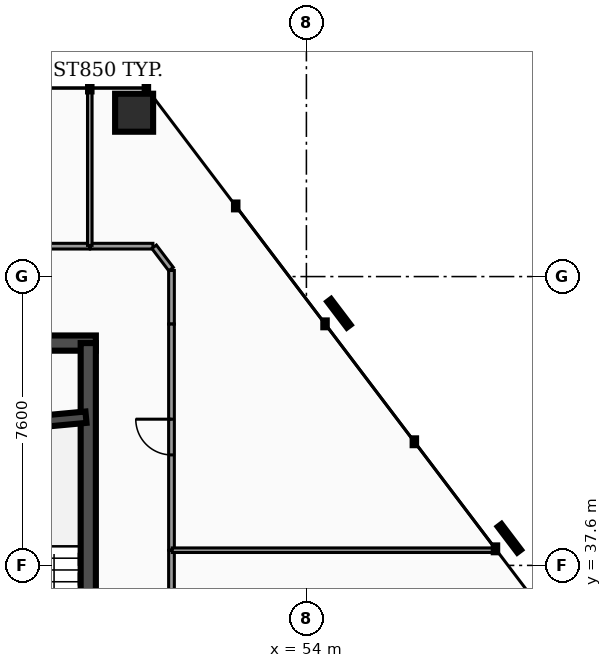
"""IFC4 building model, lengths in metres.
Left out: names, types, materials, properties, quantities, classifications, styles, units other than length and angle.
Written with IfcOpenShell. Run it as: python <this file> out.ifc"""

import sys

from ifc_helpers import new_model, si_unit, direction, frame, frame_2d, origin, origin_2d, place, context, subcontext, project, spatial, rectangle, hollow_rectangle, extrude, element, fill, save


model = new_model("IFC4")
c1 = context("Model", 3, precision=1e-05, world=origin(), true_north=direction((0.0, 1.0)))
c2 = subcontext(c1, "Body", "Model", "MODEL_VIEW")
j1 = project(units=[si_unit("LENGTHUNIT", "METRE"), si_unit("PLANEANGLEUNIT", "RADIAN")], contexts=[c1])
p1 = place(None, origin())
s1 = spatial("IfcSite", under=j1, at=p1, CompositionType="ELEMENT")
p2 = place(p1, origin())
s2 = spatial("IfcBuilding", under=s1, at=p2, CompositionType="ELEMENT")
p3 = place(p2, frame((0.0, 0.0, 35.7)))
s3 = spatial("IfcBuildingStorey", under=s2, at=p3, CompositionType="ELEMENT", Elevation=35.7)
p4 = place(p3, frame((28.4, 43.45, 0.0), z_axis=(0.0, 0.0, 1.0), x_axis=(1.0, 0.0, 0.0)))
e1 = element("IfcWall", 1, at=p4, inside=s3, PredefinedType="SHEAR", context=c2, shape_type="SweptSolid", body=[
    extrude(rectangle(XDim=20.06, YDim=0.4, at=frame_2d((10.03, 0.0))), origin(), (0.0, 0.0, 1.0), 3.82),
])
p5 = place(p3, frame((48.26, 33.25, 0.0), z_axis=(0.0, 0.0, 1.0), x_axis=(0.0, 1.0, 0.0)))
e2 = element("IfcWall", 2, at=p5, inside=s3, PredefinedType="SHEAR", context=c2, shape_type="SweptSolid", body=[
    extrude(rectangle(XDim=10.2, YDim=0.4, at=frame_2d((5.1, 0.0))), origin(), (0.0, 0.0, 1.0), 3.82),
])
p6 = place(p3, frame((44.98, 41.2, 0.0), z_axis=(0.0, 0.0, 1.0), x_axis=(0.995686468965, 0.09278176286, 0.0)))
e3 = element("IfcWall", 3, at=p6, inside=s3, PredefinedType="SHEAR", context=c2, shape_type="SweptSolid", body=[
    extrude(rectangle(XDim=3.234, YDim=0.3, at=frame_2d((1.617, 0.0))), origin(), (0.0, 0.0, 1.0), 3.82),
])
p7 = place(p3, frame((49.466, 49.511, 0.0), z_axis=(0.144992669911, -0.030212073329, 0.988971362729), x_axis=(0.20398833749, 0.978973318415, 0.0)))
e4 = element("IfcColumn", 4, at=p7, inside=s3, PredefinedType="COLUMN", context=c2, shape_type="SweptSolid", body=[
    extrude(hollow_rectangle(XDim=1.0, YDim=1.0, WallThickness=0.05, at=origin_2d()), origin(), (0.0, 0.0, 1.0), 3.863),
])
p8 = place(p3, frame((50.45, 30.17, 0.0), z_axis=(0.0, 0.0, 1.0), x_axis=(0.0, 1.0, 0.0)))
e5 = element("IfcWall", 5, at=p8, inside=s3, PredefinedType="PARTITIONING", context=c2, shape_type="SweptSolid", body=[
    extrude(rectangle(XDim=7.825, YDim=0.15, at=frame_2d((3.913, 0.0))), origin(), (0.0, 0.0, 1.0), 2.777),
])
p9 = place(p8, frame((3.442, 0.0, 0.0)))
e6 = element("IfcOpeningElement", 6, at=p9, cuts=e5, PredefinedType="OPENING", context=c2, shape_type="SweptSolid", body=[
    extrude(rectangle(XDim=0.94, YDim=2.05, at=frame_2d((0.47, 1.025))), frame((0.0, 0.085, 0.0), z_axis=(0.0, -1.0, 0.0), x_axis=(1.0, 0.0, 0.0)), (0.0, 0.0, 1.0), 0.17),
])
p10 = place(p3, frame((48.315, 46.0, 0.0), z_axis=(0.0, 0.0, 1.0), x_axis=(1.0, 0.0, 0.0)))
e7 = element("IfcWall", 7, at=p10, inside=s3, PredefinedType="PARTITIONING", context=c2, shape_type="SweptSolid", body=[
    extrude(rectangle(XDim=1.646, YDim=0.15, at=frame_2d((0.823, 0.0))), origin(), (0.0, 0.0, 1.0), 2.777),
])
p11 = place(p3, frame((49.993, 45.984, 0.0), z_axis=(0.0, 0.0, 1.0), x_axis=(0.603704571474, -0.797208122375, 0.0)))
e8 = element("IfcWall", 8, at=p11, inside=s3, PredefinedType="PARTITIONING", context=c2, shape_type="SweptSolid", body=[
    extrude(rectangle(XDim=0.737, YDim=0.15, at=frame_2d((0.368, 0.0))), origin(), (0.0, 0.0, 1.0), 2.777),
])
p12 = place(p3, frame((50.45, 43.95, 0.0), z_axis=(0.0, 0.0, 1.0), x_axis=(0.0, 1.0, 0.0)))
e9 = element("IfcWall", 9, at=p12, inside=s3, PredefinedType="PARTITIONING", context=c2, shape_type="SweptSolid", body=[
    extrude(rectangle(XDim=1.411, YDim=0.15, at=frame_2d((0.706, 0.0))), origin(), (0.0, 0.0, 1.0), 2.777),
])
p13 = place(p3, frame((50.45, 38.005, 0.0), z_axis=(0.0, 0.0, 1.0), x_axis=(0.0, 1.0, 0.0)))
e10 = element("IfcWall", 10, at=p13, inside=s3, PredefinedType="PARTITIONING", context=c2, shape_type="SweptSolid", body=[
    extrude(rectangle(XDim=5.945, YDim=0.15, at=frame_2d((2.973, 0.0))), origin(), (0.0, 0.0, 1.0), 2.777),
])
p14 = place(p13, frame((2.502, 0.0, 0.0)))
e11 = element("IfcOpeningElement", 11, at=p14, cuts=e10, PredefinedType="OPENING", context=c2, shape_type="SweptSolid", body=[
    extrude(rectangle(XDim=0.94, YDim=2.05, at=frame_2d((0.47, 1.025))), frame((0.0, 0.085, 0.0), z_axis=(0.0, -1.0, 0.0), x_axis=(1.0, 0.0, 0.0)), (0.0, 0.0, 1.0), 0.17),
])
p15 = place(p3, frame((42.605, 46.0, 0.0), z_axis=(0.0, 0.0, 1.0), x_axis=(1.0, 0.0, 0.0)))
e12 = element("IfcWall", 12, at=p15, inside=s3, PredefinedType="PARTITIONING", context=c2, shape_type="SweptSolid", body=[
    extrude(rectangle(XDim=5.69, YDim=0.15, at=frame_2d((2.845, 0.0))), origin(), (0.0, 0.0, 1.0), 2.777),
])
p16 = place(p15, frame((2.375, 0.0, 0.0)))
e13 = element("IfcOpeningElement", 13, at=p16, cuts=e12, PredefinedType="OPENING", context=c2, shape_type="SweptSolid", body=[
    extrude(rectangle(XDim=0.94, YDim=2.05, at=frame_2d((0.47, 1.025))), frame((0.0, 0.085, 0.0), z_axis=(0.0, -1.0, 0.0), x_axis=(1.0, 0.0, 0.0)), (0.0, 0.0, 1.0), 0.17),
])
p17 = place(p3, frame((50.47, 38.0, 0.0), z_axis=(0.0, 0.0, 1.0), x_axis=(1.0, 0.0, 0.0)))
e14 = element("IfcWall", 14, at=p17, inside=s3, PredefinedType="PARTITIONING", context=c2, shape_type="SweptSolid", body=[
    extrude(rectangle(XDim=8.517, YDim=0.12, at=frame_2d((4.259, 0.0))), origin(), (0.0, 0.0, 1.0), 2.777),
])
p18 = place(p3, frame((48.3, 46.02, 0.0), z_axis=(0.0, 0.0, 1.0), x_axis=(0.0, 1.0, 0.0)))
e15 = element("IfcWall", 15, at=p18, inside=s3, PredefinedType="PARTITIONING", context=c2, shape_type="SweptSolid", body=[
    extrude(rectangle(XDim=4.126, YDim=0.12, at=frame_2d((2.063, 0.0))), origin(), (0.0, 0.0, 1.0), 2.777),
])
p19 = place(p14, origin())
e16 = element("IfcDoor", 16, at=p19, inside=s3, OperationType="SINGLE_SWING_RIGHT", PredefinedType="DOOR", context=c2, shape_type="SweptSolid", body=[
    extrude(rectangle(XDim=0.94, YDim=2.05, at=frame_2d((0.47, 1.025))), frame((0.0, 0.025, 0.0), z_axis=(0.0, -1.0, 0.0), x_axis=(1.0, 0.0, 0.0)), (0.0, 0.0, 1.0), 0.05),
])
fill(e11, e16)
save(model, sys.argv[1])
